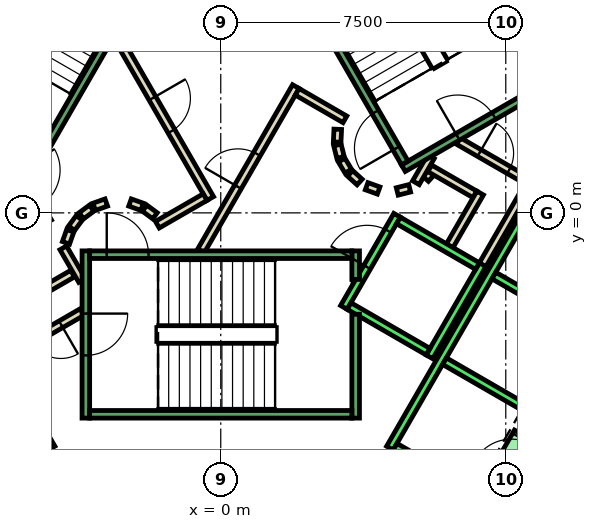
"""IFC4 building model, lengths in metres.
Left out: names, types, materials, properties, quantities, classifications, styles, units other than length and angle.
Written with IfcOpenShell. Run it as: python <this file> out.ifc"""

import sys

from ifc_helpers import new_model, si_unit, direction, frame, frame_2d, origin, place, context, subcontext, project, spatial, polyline, rectangle, outline, extrude, element, fill, save


model = new_model("IFC4")
c1 = context("Model", 3, precision=1e-05, world=origin(), true_north=direction((0.0, 1.0)))
c2 = subcontext(c1, "Body", "Model", "MODEL_VIEW")
j1 = project(units=[si_unit("LENGTHUNIT", "METRE"), si_unit("PLANEANGLEUNIT", "RADIAN")], contexts=[c1])
p1 = place(None, origin())
s1 = spatial("IfcSite", under=j1, at=p1, CompositionType="ELEMENT")
p2 = place(p1, origin())
s2 = spatial("IfcBuilding", under=s1, at=p2, CompositionType="ELEMENT")
p3 = place(p2, frame((0.0, 0.0, 39.2)))
s3 = spatial("IfcBuildingStorey", under=s2, at=p3, CompositionType="ELEMENT", Elevation=39.2)
p4 = place(p3, frame((0.0, 0.0, -0.4)))
e1 = element("IfcWall", 1, at=p4, inside=s3, PredefinedType="SHEAR", context=c2, shape_type="SweptSolid", body=[
    extrude(outline(polyline([(8.517, 11.748), (7.651, 11.248), (12.702, 2.5), (13.856, 2.5), (8.517, 11.748)])), origin(), (0.0, 0.0, 1.0), 4.2),
])
p5 = place(p3, frame((0.0, 0.0, 3.6)))
e2 = element("IfcWall", 2, at=p5, inside=s3, PredefinedType="SHEAR", context=c2, shape_type="SweptSolid", body=[
    extrude(outline(polyline([(8.767, -6.314), (7.902, -5.814), (7.252, -6.94), (8.117, -7.44), (8.767, -6.314)])), origin(), (0.0, 0.0, 1.0), 0.2),
])
p6 = place(p3, frame((5.39, 0.898, 0.0), z_axis=(0.0, 0.0, 1.0), x_axis=(0.673828488714, 0.738887791073, 0.0)))
e3 = element("IfcWall", 3, at=p6, inside=s3, PredefinedType="PARTITIONING", context=c2, shape_type="SweptSolid", body=[
    extrude(rectangle(XDim=0.263, YDim=0.2, at=frame_2d((0.131, 0.0))), origin(), (0.0, 0.0, 1.0), 3.8),
])
p7 = place(p3, frame((5.499, 1.172, 0.0), z_axis=(0.0, 0.0, 1.0), x_axis=(0.866333505267, -0.499465972466, 0.0)))
e4 = element("IfcWall", 4, at=p7, inside=s3, PredefinedType="PARTITIONING", context=c2, shape_type="SweptSolid", body=[
    extrude(rectangle(XDim=1.374, YDim=0.2, at=frame_2d((0.687, 0.0))), origin(), (0.0, 0.0, 1.0), 3.8),
])
p8 = place(p3, frame((6.826, 0.522, 0.0), z_axis=(0.0, 0.0, 1.0), x_axis=(-0.500016722714, -0.866015748706, 0.0)))
e5 = element("IfcWall", 5, at=p8, inside=s3, PredefinedType="PARTITIONING", context=c2, shape_type="SweptSolid", body=[
    extrude(rectangle(XDim=1.7, YDim=0.2, at=frame_2d((0.85, 0.0))), origin(), (0.0, 0.0, 1.0), 3.8),
])
p9 = place(p3, frame((6.25, 1.894, 0.0), z_axis=(0.0, 0.0, 1.0), x_axis=(0.866043184279, -0.499969202016, 0.0)))
e6 = element("IfcWall", 6, at=p9, inside=s3, PredefinedType="PARTITIONING", context=c2, shape_type="SweptSolid", body=[
    extrude(rectangle(XDim=2.084, YDim=0.2, at=frame_2d((1.042, 0.0))), origin(), (0.0, 0.0, 1.0), 3.8),
])
p10 = place(p9, frame((0.642, 0.0, 0.0)))
e7 = element("IfcOpeningElement", 7, at=p10, cuts=e6, PredefinedType="OPENING", context=c2, shape_type="SweptSolid", body=[
    extrude(rectangle(XDim=0.9, YDim=2.1, at=frame_2d((0.45, 1.05))), frame((0.0, 0.11, 0.0), z_axis=(0.0, -1.0, 0.0), x_axis=(1.0, 0.0, 0.0)), (0.0, 0.0, 1.0), 0.22),
])
p11 = place(p3, frame((8.192, 0.888, 0.0), z_axis=(0.0, 0.0, 1.0), x_axis=(-0.499940625693, -0.866059680843, 0.0)))
e8 = element("IfcWall", 8, at=p11, inside=s3, PredefinedType="PARTITIONING", context=c2, shape_type="SweptSolid", body=[
    extrude(rectangle(XDim=2.68, YDim=0.2, at=frame_2d((1.34, 0.0))), origin(), (0.0, 0.0, 1.0), 3.8),
])
p12 = place(p3, frame((5.135, 0.793, 0.0), z_axis=(0.0, 0.0, 1.0), x_axis=(0.499526442893, 0.866298639529, 0.0)))
e9 = element("IfcWall", 9, at=p12, inside=s3, PredefinedType="PARTITIONING", context=c2, shape_type="SweptSolid", body=[
    extrude(rectangle(XDim=0.791, YDim=0.2, at=frame_2d((0.396, 0.0))), origin(), (0.0, 0.0, 1.0), 3.8),
])
p13 = place(p3, frame((-3.9, -1.599, 0.0), z_axis=(0.0, 0.0, 1.0), x_axis=(-0.865969445389, -0.500096910261, 0.0)))
e10 = element("IfcWall", 10, at=p13, inside=s3, PredefinedType="PARTITIONING", context=c2, shape_type="SweptSolid", body=[
    extrude(rectangle(XDim=1.373, YDim=0.2, at=frame_2d((0.687, 0.0))), origin(), (0.0, 0.0, 1.0), 3.8),
])
p14 = place(p3, frame((-3.65, -2.61, 0.0), z_axis=(0.0, 0.0, 1.0), x_axis=(-0.866072462134, -0.499918483688, 0.0)))
e11 = element("IfcWall", 11, at=p14, inside=s3, PredefinedType="PARTITIONING", context=c2, shape_type="SweptSolid", body=[
    extrude(rectangle(XDim=2.084, YDim=0.2, at=frame_2d((1.042, 0.0))), origin(), (0.0, 0.0, 1.0), 3.8),
])
p15 = place(p14, frame((0.642, 0.0, 0.0)))
e12 = element("IfcOpeningElement", 12, at=p15, cuts=e11, PredefinedType="OPENING", context=c2, shape_type="SweptSolid", body=[
    extrude(rectangle(XDim=0.9, YDim=2.1, at=frame_2d((0.45, 1.05))), frame((0.0, 0.11, 0.0), z_axis=(0.0, -1.0, 0.0), x_axis=(1.0, 0.0, 0.0)), (0.0, 0.0, 1.0), 0.22),
])
p16 = place(p3, frame((-4.145, -0.92, 0.0), z_axis=(0.0, 0.0, 1.0), x_axis=(0.499743786207, -0.866173278362, 0.0)))
e13 = element("IfcWall", 13, at=p16, inside=s3, PredefinedType="PARTITIONING", context=c2, shape_type="SweptSolid", body=[
    extrude(rectangle(XDim=0.991, YDim=0.2, at=frame_2d((0.495, 0.0))), origin(), (0.0, 0.0, 1.0), 3.8),
])
p17 = place(p3, frame((-0.52, -1.0, 0.0), z_axis=(0.0, 0.0, 1.0), x_axis=(0.50011622646, 0.865958290007, 0.0)))
e14 = element("IfcWall", 14, at=p17, inside=s3, PredefinedType="PARTITIONING", context=c2, shape_type="SweptSolid", body=[
    extrude(rectangle(XDim=4.991, YDim=0.2, at=frame_2d((2.496, 0.0))), origin(), (0.0, 0.0, 1.0), 3.8),
])
p18 = place(p17, frame((1.945, 0.0, 0.0)))
e15 = element("IfcOpeningElement", 15, at=p18, cuts=e14, PredefinedType="OPENING", context=c2, shape_type="SweptSolid", body=[
    extrude(rectangle(XDim=1.0, YDim=2.1, at=frame_2d((0.5, 1.05))), frame((0.0, 0.11, 0.0), z_axis=(0.0, -1.0, 0.0), x_axis=(1.0, 0.0, 0.0)), (0.0, 0.0, 1.0), 0.22),
])
p19 = place(p3, frame((2.012, 3.186, 0.0), z_axis=(0.0, 0.0, 1.0), x_axis=(0.865891012941, -0.500232699559, 0.0)))
e16 = element("IfcWall", 16, at=p19, inside=s3, PredefinedType="PARTITIONING", context=c2, shape_type="SweptSolid", body=[
    extrude(rectangle(XDim=1.449, YDim=0.2, at=frame_2d((0.725, 0.0))), origin(), (0.0, 0.0, 1.0), 3.8),
])
p20 = place(p3, frame((3.079, 2.199, 0.0), z_axis=(0.0, 0.0, 1.0), x_axis=(-0.047771483479, -0.998858290933, 0.0)))
e17 = element("IfcWall", 17, at=p20, inside=s3, PredefinedType="PARTITIONING", context=c2, shape_type="SweptSolid", body=[
    extrude(rectangle(XDim=0.337, YDim=0.2, at=frame_2d((0.169, 0.0))), origin(), (0.0, 0.0, 1.0), 3.8),
])
p21 = place(p3, frame((3.07, 1.786, 0.0), z_axis=(0.0, 0.0, 1.0), x_axis=(0.242705583207, -0.970099994784, 0.0)))
e18 = element("IfcWall", 18, at=p21, inside=s3, PredefinedType="PARTITIONING", context=c2, shape_type="SweptSolid", body=[
    extrude(rectangle(XDim=0.338, YDim=0.2, at=frame_2d((0.169, 0.0))), origin(), (0.0, 0.0, 1.0), 3.8),
])
for number, where, z_axis, x_axis in (
    (19, (3.182, 1.388, 0.0), (0.0, 0.0, 1.0), (0.512, -0.859, 0.0)),
    (20, (3.404, 1.039, 0.0), (0.0, 0.0, 1.0), (0.74, -0.672, 0.0)),
):
    element("IfcWall", number, at=place(p3, frame(where, z_axis=z_axis, x_axis=x_axis)), inside=s3, PredefinedType="PARTITIONING", context=c2, shape_type="SweptSolid", body=[
        extrude(rectangle(XDim=0.338, YDim=0.2, at=frame_2d((0.169, 0.0))), origin(), (0.0, 0.0, 1.0), 3.8),
    ])
p22 = place(p3, frame((3.838, 0.702, 0.0), z_axis=(0.0, 0.0, 1.0), x_axis=(0.941035081519, -0.338308993895, 0.0)))
e21 = element("IfcWall", 21, at=p22, inside=s3, PredefinedType="PARTITIONING", context=c2, shape_type="SweptSolid", body=[
    extrude(rectangle(XDim=0.337, YDim=0.2, at=frame_2d((0.168, 0.0))), origin(), (0.0, 0.0, 1.0), 3.8),
])
p23 = place(p3, frame((4.644, 0.564, 0.0), z_axis=(0.0, 0.0, 1.0), x_axis=(0.969929076366, 0.243387729394, 0.0)))
e22 = element("IfcWall", 22, at=p23, inside=s3, PredefinedType="PARTITIONING", context=c2, shape_type="SweptSolid", body=[
    extrude(rectangle(XDim=0.337, YDim=0.2, at=frame_2d((0.168, 0.0))), origin(), (0.0, 0.0, 1.0), 3.8),
])
p24 = place(p3, frame((-2.771, 4.7, 0.0), z_axis=(0.0, 0.0, 1.0), x_axis=(0.499969479948, -0.866043023828, 0.0)))
e23 = element("IfcWall", 23, at=p24, inside=s3, PredefinedType="PARTITIONING", context=c2, shape_type="SweptSolid", body=[
    extrude(rectangle(XDim=4.99, YDim=0.2, at=frame_2d((2.495, 0.0))), origin(), (0.0, 0.0, 1.0), 3.8),
])
p25 = place(p24, frame((1.945, 0.0, 0.0)))
e24 = element("IfcOpeningElement", 24, at=p25, cuts=e23, PredefinedType="OPENING", context=c2, shape_type="SweptSolid", body=[
    extrude(rectangle(XDim=1.0, YDim=2.1, at=frame_2d((0.5, 1.05))), frame((0.0, 0.11, 0.0), z_axis=(0.0, -1.0, 0.0), x_axis=(1.0, 0.0, 0.0)), (0.0, 0.0, 1.0), 0.22),
])
p26 = place(p3, frame((-0.412, 0.414, 0.0), z_axis=(0.0, 0.0, 1.0), x_axis=(-0.866017369001, -0.500013916395, 0.0)))
e25 = element("IfcWall", 25, at=p26, inside=s3, PredefinedType="PARTITIONING", context=c2, shape_type="SweptSolid", body=[
    extrude(rectangle(XDim=1.45, YDim=0.2, at=frame_2d((0.725, 0.0))), origin(), (0.0, 0.0, 1.0), 3.8),
])
p27 = place(p3, frame((-1.731, -0.077, 0.0), z_axis=(0.0, 0.0, 1.0), x_axis=(-0.804311165252, 0.594208338422, 0.0)))
e26 = element("IfcWall", 26, at=p27, inside=s3, PredefinedType="PARTITIONING", context=c2, shape_type="SweptSolid", body=[
    extrude(rectangle(XDim=0.338, YDim=0.2, at=frame_2d((0.169, 0.0))), origin(), (0.0, 0.0, 1.0), 3.8),
])
p28 = place(p3, frame((-2.07, 0.16, 0.0), z_axis=(0.0, 0.0, 1.0), x_axis=(-0.942199461132, 0.335052496547, 0.0)))
e27 = element("IfcWall", 27, at=p28, inside=s3, PredefinedType="PARTITIONING", context=c2, shape_type="SweptSolid", body=[
    extrude(rectangle(XDim=0.337, YDim=0.2, at=frame_2d((0.169, 0.0))), origin(), (0.0, 0.0, 1.0), 3.8),
])
p29 = place(p3, frame((-3.012, 0.273, 0.0), z_axis=(0.0, 0.0, 1.0), x_axis=(-0.942280615813, -0.334824194261, 0.0)))
e28 = element("IfcWall", 28, at=p29, inside=s3, PredefinedType="PARTITIONING", context=c2, shape_type="SweptSolid", body=[
    extrude(rectangle(XDim=0.338, YDim=0.2, at=frame_2d((0.169, 0.0))), origin(), (0.0, 0.0, 1.0), 3.8),
])
p30 = place(p3, frame((-3.397, 0.124, 0.0), z_axis=(0.0, 0.0, 1.0), x_axis=(-0.804311165252, -0.594208338422, 0.0)))
e29 = element("IfcWall", 29, at=p30, inside=s3, PredefinedType="PARTITIONING", context=c2, shape_type="SweptSolid", body=[
    extrude(rectangle(XDim=0.338, YDim=0.2, at=frame_2d((0.169, 0.0))), origin(), (0.0, 0.0, 1.0), 3.8),
])
p31 = place(p3, frame((-3.723, -0.131, 0.0), z_axis=(0.0, 0.0, 1.0), x_axis=(-0.594675113454, -0.803966112121, 0.0)))
e30 = element("IfcWall", 30, at=p31, inside=s3, PredefinedType="PARTITIONING", context=c2, shape_type="SweptSolid", body=[
    extrude(rectangle(XDim=0.338, YDim=0.2, at=frame_2d((0.169, 0.0))), origin(), (0.0, 0.0, 1.0), 3.8),
])
p32 = place(p3, frame((-3.96, -0.47, 0.0), z_axis=(0.0, 0.0, 1.0), x_axis=(-0.334824194261, -0.942280615813, 0.0)))
e31 = element("IfcWall", 31, at=p32, inside=s3, PredefinedType="PARTITIONING", context=c2, shape_type="SweptSolid", body=[
    extrude(rectangle(XDim=0.338, YDim=0.2, at=frame_2d((0.169, 0.0))), origin(), (0.0, 0.0, 1.0), 3.8),
])
p33 = place(p3, frame((-9.751, 2.99, 0.0), z_axis=(0.0, 0.0, 1.0), x_axis=(0.50000090737, -0.866024879913, 0.0)))
e32 = element("IfcWall", 32, at=p33, inside=s3, PredefinedType="STANDARD", context=c2, shape_type="SweptSolid", body=[
    extrude(rectangle(XDim=10.6, YDim=0.2, at=frame_2d((5.3, 0.0))), origin(), (0.0, 0.0, 1.0), 3.8),
])
p34 = place(p3, frame((3.24, -2.488, 0.0), z_axis=(0.0, 0.0, 1.0), x_axis=(0.49994636267, 0.866056369097, 0.0)))
e33 = element("IfcWall", 33, at=p34, inside=s3, PredefinedType="STANDARD", context=c2, shape_type="SweptSolid", body=[
    extrude(rectangle(XDim=2.8, YDim=0.2, at=frame_2d((1.4, 0.0))), origin(), (0.0, 0.0, 1.0), 3.8),
])
p35 = place(p34, frame((1.225, 0.0, 0.0)))
e34 = element("IfcOpeningElement", 34, at=p35, cuts=e33, PredefinedType="OPENING", context=c2, shape_type="SweptSolid", body=[
    extrude(rectangle(XDim=1.1, YDim=2.1, at=frame_2d((0.55, 1.05))), frame((0.0, 0.11, 0.0), z_axis=(0.0, -1.0, 0.0), x_axis=(1.0, 0.0, 0.0)), (0.0, 0.0, 1.0), 0.22),
])
p36 = place(p3, frame((5.492, -3.788, 0.0), z_axis=(0.0, 0.0, 1.0), x_axis=(0.500011755427, 0.866018616679, 0.0)))
e35 = element("IfcWall", 35, at=p36, inside=s3, PredefinedType="STANDARD", context=c2, shape_type="SweptSolid", body=[
    extrude(rectangle(XDim=2.8, YDim=0.2, at=frame_2d((1.4, 0.0))), origin(), (0.0, 0.0, 1.0), 3.8),
])
p37 = place(p3, frame((3.377, -2.452, 0.0), z_axis=(0.0, 0.0, 1.0), x_axis=(0.865955154139, -0.50012165622, 0.0)))
e36 = element("IfcWall", 36, at=p37, inside=s3, PredefinedType="STANDARD", context=c2, shape_type="SweptSolid", body=[
    extrude(rectangle(XDim=2.4, YDim=0.2, at=frame_2d((1.2, 0.0))), origin(), (0.0, 0.0, 1.0), 3.8),
])
p38 = place(p3, frame((4.677, -0.2, 0.0), z_axis=(0.0, 0.0, 1.0), x_axis=(0.865973769406, -0.500089422704, 0.0)))
e37 = element("IfcWall", 37, at=p38, inside=s3, PredefinedType="STANDARD", context=c2, shape_type="SweptSolid", body=[
    extrude(rectangle(XDim=2.399, YDim=0.2, at=frame_2d((1.2, 0.0))), origin(), (0.0, 0.0, 1.0), 3.8),
])
p39 = place(p3, frame((4.451, -6.19, 0.0), z_axis=(0.0, 0.0, 1.0), x_axis=(0.50000090737, 0.866024879913, 0.0)))
e38 = element("IfcWall", 38, at=p39, inside=s3, PredefinedType="STANDARD", context=c2, shape_type="SweptSolid", body=[
    extrude(rectangle(XDim=10.6, YDim=0.2, at=frame_2d((5.3, 0.0))), origin(), (0.0, 0.0, 1.0), 3.8),
])
for number, where, z_axis, x_axis in (
    (39, (4.588, -6.153, 0.0), (0.0, 0.0, 1.0), (0.866, -0.5, 0.0)),
    (40, (5.888, -3.902, 0.0), (0.0, 0.0, 1.0), (0.866, -0.5, 0.0)),
    (41, (7.188, -1.65, 0.0), (0.0, 0.0, 1.0), (0.866, -0.5, 0.0)),
):
    element("IfcWall", number, at=place(p3, frame(where, z_axis=z_axis, x_axis=x_axis)), inside=s3, PredefinedType="STANDARD", context=c2, shape_type="SweptSolid", body=[
        extrude(rectangle(XDim=2.5, YDim=0.2, at=frame_2d((1.25, 0.0))), origin(), (0.0, 0.0, 1.0), 3.8),
    ])
p40 = place(p3, frame((7.598, -7.14, 0.0), z_axis=(0.0, 0.0, 1.0), x_axis=(0.500362116554, 0.865816234728, 0.0)))
e42 = element("IfcWall", 42, at=p40, inside=s3, PredefinedType="STANDARD", context=c2, shape_type="SweptSolid", body=[
    extrude(rectangle(XDim=1.299, YDim=1.2, at=frame_2d((0.65, 0.0))), origin(), (0.0, 0.0, 1.0), 2.4),
])
p41 = place(p40, frame((0.1, 0.0, 0.0)))
e43 = element("IfcOpeningElement", 43, at=p41, cuts=e42, PredefinedType="OPENING", context=c2, shape_type="SweptSolid", body=[
    extrude(rectangle(XDim=1.1, YDim=2.3, at=frame_2d((0.55, 1.15))), frame((0.0, 0.61, 0.0), z_axis=(0.0, -1.0, 0.0), x_axis=(1.0, 0.0, 0.0)), (0.0, 0.0, 1.0), 1.22),
])
p42 = place(p3, frame((-3.55, -1.0, 0.0), z_axis=(0.0, 0.0, 1.0), x_axis=(0.0, -1.0, 0.0)))
e44 = element("IfcWall", 44, at=p42, inside=s3, PredefinedType="STANDARD", context=c2, shape_type="SweptSolid", body=[
    extrude(rectangle(XDim=4.4, YDim=0.2, at=frame_2d((2.2, 0.0))), origin(), (0.0, 0.0, 1.0), 3.8),
])
p43 = place(p42, frame((1.65, 0.0, 0.0)))
e45 = element("IfcOpeningElement", 45, at=p43, cuts=e44, PredefinedType="OPENING", context=c2, shape_type="SweptSolid", body=[
    extrude(rectangle(XDim=1.1, YDim=2.2, at=frame_2d((0.55, 1.1))), frame((0.0, 0.11, 0.0), z_axis=(0.0, -1.0, 0.0), x_axis=(1.0, 0.0, 0.0)), (0.0, 0.0, 1.0), 0.22),
])
p44 = place(p3, frame((3.55, -2.667, 0.0), z_axis=(0.0, 0.0, 1.0), x_axis=(0.0, -1.0, 0.0)))
e46 = element("IfcWall", 46, at=p44, inside=s3, PredefinedType="STANDARD", context=c2, shape_type="SweptSolid", body=[
    extrude(rectangle(XDim=2.733, YDim=0.2, at=frame_2d((1.366, 0.0))), origin(), (0.0, 0.0, 1.0), 3.8),
])
p45 = place(p3, frame((3.55, -1.0, 0.0), z_axis=(0.0, 0.0, 1.0), x_axis=(0.0, -1.0, 0.0)))
e47 = element("IfcWall", 47, at=p45, inside=s3, PredefinedType="STANDARD", context=c2, shape_type="SweptSolid", body=[
    extrude(rectangle(XDim=0.751, YDim=0.2, at=frame_2d((0.375, 0.0))), origin(), (0.0, 0.0, 1.0), 3.8),
])
p46 = place(p3, frame((-3.45, -1.1, 0.0), z_axis=(0.0, 0.0, 1.0), x_axis=(1.0, 0.0, 0.0)))
e48 = element("IfcWall", 48, at=p46, inside=s3, PredefinedType="STANDARD", context=c2, shape_type="SweptSolid", body=[
    extrude(rectangle(XDim=6.9, YDim=0.2, at=frame_2d((3.45, 0.0))), origin(), (0.0, 0.0, 1.0), 3.8),
])
p47 = place(p46, frame((0.45, 0.0, 0.0)))
e49 = element("IfcOpeningElement", 49, at=p47, cuts=e48, PredefinedType="OPENING", context=c2, shape_type="SweptSolid", body=[
    extrude(rectangle(XDim=1.1, YDim=2.2, at=frame_2d((0.55, 1.1))), frame((0.0, 0.11, 0.0), z_axis=(0.0, -1.0, 0.0), x_axis=(1.0, 0.0, 0.0)), (0.0, 0.0, 1.0), 0.22),
])
p48 = place(p3, frame((-3.45, -5.3, 0.0), z_axis=(0.0, 0.0, 1.0), x_axis=(1.0, 0.0, 0.0)))
e50 = element("IfcWall", 50, at=p48, inside=s3, PredefinedType="STANDARD", context=c2, shape_type="SweptSolid", body=[
    extrude(rectangle(XDim=6.9, YDim=0.2, at=frame_2d((3.45, 0.0))), origin(), (0.0, 0.0, 1.0), 3.8),
])
p49 = place(p3, frame((4.806, 1.176, 0.0), z_axis=(0.0, 0.0, 1.0), x_axis=(0.866059941101, 0.499940174841, 0.0)))
e51 = element("IfcWall", 51, at=p49, inside=s3, PredefinedType="STANDARD", context=c2, shape_type="SweptSolid", body=[
    extrude(rectangle(XDim=4.4, YDim=0.2, at=frame_2d((2.2, 0.0))), origin(), (0.0, 0.0, 1.0), 3.8),
])
p50 = place(p49, frame((1.65, 0.0, 0.0)))
e52 = element("IfcOpeningElement", 52, at=p50, cuts=e51, PredefinedType="OPENING", context=c2, shape_type="SweptSolid", body=[
    extrude(rectangle(XDim=1.1, YDim=2.2, at=frame_2d((0.55, 1.1))), frame((0.0, 0.11, 0.0), z_axis=(0.0, -1.0, 0.0), x_axis=(1.0, 0.0, 0.0)), (0.0, 0.0, 1.0), 0.22),
])
p51 = place(p3, frame((4.843, 1.312, 0.0), z_axis=(0.0, 0.0, 1.0), x_axis=(-0.499963383562, 0.866046543262, 0.0)))
e53 = element("IfcWall", 53, at=p51, inside=s3, PredefinedType="STANDARD", context=c2, shape_type="SweptSolid", body=[
    extrude(rectangle(XDim=6.9, YDim=0.2, at=frame_2d((3.45, 0.0))), origin(), (0.0, 0.0, 1.0), 3.8),
])
p52 = place(p51, frame((0.45, 0.0, 0.0)))
e54 = element("IfcOpeningElement", 54, at=p52, cuts=e53, PredefinedType="OPENING", context=c2, shape_type="SweptSolid", body=[
    extrude(rectangle(XDim=1.1, YDim=2.2, at=frame_2d((0.55, 1.1))), frame((0.0, 0.11, 0.0), z_axis=(0.0, -1.0, 0.0), x_axis=(1.0, 0.0, 0.0)), (0.0, 0.0, 1.0), 0.22),
])
p53 = place(p3, frame((8.48, 3.412, 0.0), z_axis=(0.0, 0.0, 1.0), x_axis=(-0.499978703459, 0.866037698999, 0.0)))
e55 = element("IfcWall", 55, at=p53, inside=s3, PredefinedType="STANDARD", context=c2, shape_type="SweptSolid", body=[
    extrude(rectangle(XDim=6.9, YDim=0.2, at=frame_2d((3.45, 0.0))), origin(), (0.0, 0.0, 1.0), 3.8),
])
p54 = place(p3, frame((-1.393, 7.288, 0.0), z_axis=(0.0, 0.0, 1.0), x_axis=(-0.499963383562, -0.866046543262, 0.0)))
e56 = element("IfcWall", 56, at=p54, inside=s3, PredefinedType="STANDARD", context=c2, shape_type="SweptSolid", body=[
    extrude(rectangle(XDim=6.9, YDim=0.2, at=frame_2d((3.45, 0.0))), origin(), (0.0, 0.0, 1.0), 3.8),
])
p55 = place(p54, frame((0.45, 0.0, 0.0)))
e57 = element("IfcOpeningElement", 57, at=p55, cuts=e56, PredefinedType="OPENING", context=c2, shape_type="SweptSolid", body=[
    extrude(rectangle(XDim=1.1, YDim=2.2, at=frame_2d((0.55, 1.1))), frame((0.0, 0.11, 0.0), z_axis=(0.0, -1.0, 0.0), x_axis=(1.0, 0.0, 0.0)), (0.0, 0.0, 1.0), 0.22),
])
p56 = place(p18, origin())
e58 = element("IfcDoor", 58, at=p56, inside=s3, OperationType="SINGLE_SWING_LEFT", PredefinedType="DOOR", context=c2, shape_type="SweptSolid", body=[
    extrude(rectangle(XDim=1.0, YDim=2.1, at=frame_2d((0.5, 1.05))), frame((0.0, 0.025, 0.0), z_axis=(0.0, -1.0, 0.0), x_axis=(1.0, 0.0, 0.0)), (0.0, 0.0, 1.0), 0.05),
])
fill(e15, e58)
p57 = place(p25, origin())
e59 = element("IfcDoor", 59, at=p57, inside=s3, OperationType="SINGLE_SWING_RIGHT", PredefinedType="DOOR", context=c2, shape_type="SweptSolid", body=[
    extrude(rectangle(XDim=1.0, YDim=2.1, at=frame_2d((0.5, 1.05))), frame((0.0, 0.025, 0.0), z_axis=(0.0, -1.0, 0.0), x_axis=(1.0, 0.0, 0.0)), (0.0, 0.0, 1.0), 0.05),
])
fill(e24, e59)
p58 = place(p10, origin())
e60 = element("IfcDoor", 60, at=p58, inside=s3, OperationType="SINGLE_SWING_LEFT", PredefinedType="DOOR", context=c2, shape_type="SweptSolid", body=[
    extrude(rectangle(XDim=0.9, YDim=2.1, at=frame_2d((0.45, 1.05))), frame((0.0, 0.025, 0.0), z_axis=(0.0, -1.0, 0.0), x_axis=(1.0, 0.0, 0.0)), (0.0, 0.0, 1.0), 0.05),
])
fill(e7, e60)
p59 = place(p15, origin())
e61 = element("IfcDoor", 61, at=p59, inside=s3, OperationType="SINGLE_SWING_LEFT", PredefinedType="DOOR", context=c2, shape_type="SweptSolid", body=[
    extrude(rectangle(XDim=0.9, YDim=2.1, at=frame_2d((0.45, 1.05))), frame((0.0, 0.025, 0.0), z_axis=(0.0, -1.0, 0.0), x_axis=(1.0, 0.0, 0.0)), (0.0, 0.0, 1.0), 0.05),
])
fill(e12, e61)
p60 = place(p41, origin())
e62 = element("IfcDoor", 62, at=p60, inside=s3, OperationType="SLIDING_TO_LEFT", PredefinedType="DOOR", context=c2, shape_type="SweptSolid", body=[
    extrude(rectangle(XDim=1.1, YDim=2.3, at=frame_2d((0.55, 1.15))), frame((0.0, 0.025, 0.0), z_axis=(0.0, -1.0, 0.0), x_axis=(1.0, 0.0, 0.0)), (0.0, 0.0, 1.0), 0.05),
])
fill(e43, e62)
p61 = place(p35, origin())
e63 = element("IfcDoor", 63, at=p61, inside=s3, OperationType="SLIDING_TO_LEFT", PredefinedType="DOOR", context=c2, shape_type="SweptSolid", body=[
    extrude(rectangle(XDim=1.1, YDim=2.1, at=frame_2d((0.55, 1.05))), frame((0.0, 0.025, 0.0), z_axis=(0.0, -1.0, 0.0), x_axis=(1.0, 0.0, 0.0)), (0.0, 0.0, 1.0), 0.05),
])
fill(e34, e63)
p62 = place(p47, origin())
e64 = element("IfcDoor", 64, at=p62, inside=s3, OperationType="SINGLE_SWING_LEFT", PredefinedType="DOOR", context=c2, shape_type="SweptSolid", body=[
    extrude(rectangle(XDim=1.1, YDim=2.2, at=frame_2d((0.55, 1.1))), frame((0.0, 0.025, 0.0), z_axis=(0.0, -1.0, 0.0), x_axis=(1.0, 0.0, 0.0)), (0.0, 0.0, 1.0), 0.05),
])
fill(e49, e64)
p63 = place(p43, origin())
e65 = element("IfcDoor", 65, at=p63, inside=s3, OperationType="SINGLE_SWING_LEFT", PredefinedType="DOOR", context=c2, shape_type="SweptSolid", body=[
    extrude(rectangle(XDim=1.1, YDim=2.2, at=frame_2d((0.55, 1.1))), frame((0.0, 0.025, 0.0), z_axis=(0.0, -1.0, 0.0), x_axis=(1.0, 0.0, 0.0)), (0.0, 0.0, 1.0), 0.05),
])
fill(e45, e65)
p64 = place(p52, origin())
e66 = element("IfcDoor", 66, at=p64, inside=s3, OperationType="SINGLE_SWING_LEFT", PredefinedType="DOOR", context=c2, shape_type="SweptSolid", body=[
    extrude(rectangle(XDim=1.1, YDim=2.2, at=frame_2d((0.55, 1.1))), frame((0.0, 0.025, 0.0), z_axis=(0.0, -1.0, 0.0), x_axis=(1.0, 0.0, 0.0)), (0.0, 0.0, 1.0), 0.05),
])
fill(e54, e66)
p65 = place(p50, origin())
e67 = element("IfcDoor", 67, at=p65, inside=s3, OperationType="SINGLE_SWING_LEFT", PredefinedType="DOOR", context=c2, shape_type="SweptSolid", body=[
    extrude(rectangle(XDim=1.1, YDim=2.2, at=frame_2d((0.55, 1.1))), frame((0.0, 0.025, 0.0), z_axis=(0.0, -1.0, 0.0), x_axis=(1.0, 0.0, 0.0)), (0.0, 0.0, 1.0), 0.05),
])
fill(e52, e67)
save(model, sys.argv[1])
